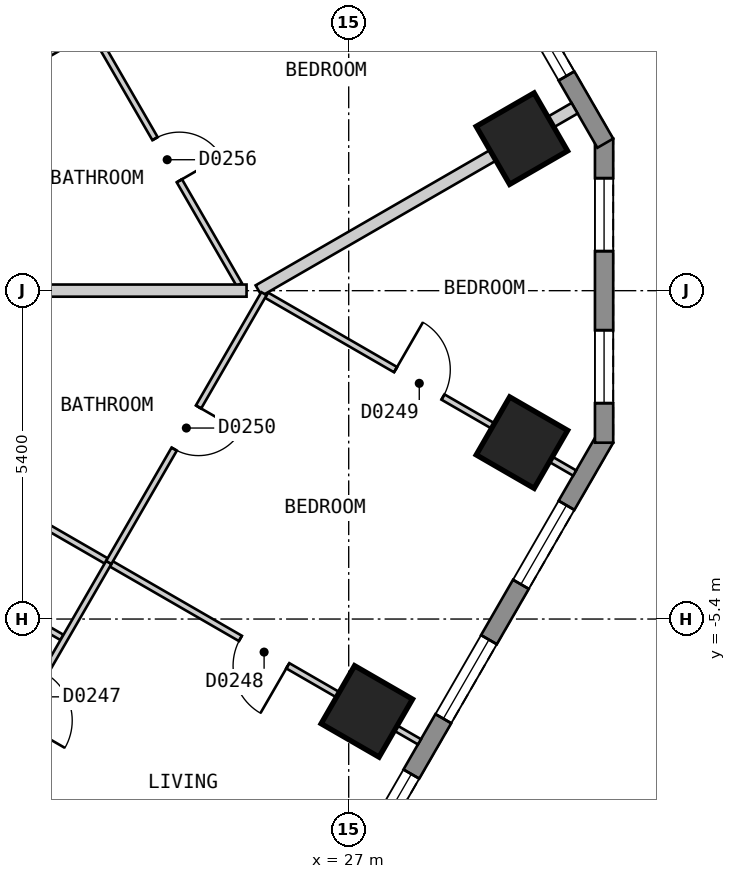
"""IFC4 building model, lengths in metres.
Left out: names, types, materials, properties, quantities, classifications, styles, units other than length and angle.
Written with IfcOpenShell. Run it as: python <this file> out.ifc"""

import sys

from ifc_helpers import new_model, si_unit, direction, frame, frame_2d, origin, origin_2d, place, context, subcontext, project, spatial, polyline, rectangle, outline, extrude, element, fill, save


model = new_model("IFC4")
c1 = context("Model", 3, precision=1e-05, world=origin(), true_north=direction((0.0, 1.0)))
c2 = subcontext(c1, "Body", "Model", "MODEL_VIEW")
j1 = project(units=[si_unit("LENGTHUNIT", "METRE"), si_unit("PLANEANGLEUNIT", "RADIAN")], contexts=[c1])
p1 = place(None, origin())
s1 = spatial("IfcSite", under=j1, at=p1, CompositionType="ELEMENT")
p2 = place(p1, origin())
s2 = spatial("IfcBuilding", under=s1, at=p2, CompositionType="ELEMENT")
p3 = place(p2, frame((0.0, 0.0, 47.4)))
s3 = spatial("IfcBuildingStorey", under=s2, at=p3, CompositionType="ELEMENT", Elevation=47.4)
for number, where, z_axis, x_axis in (
    (1, (27.298, -6.919, 0.0), (0.0, 0.0, 1.0), (0.5, 0.866, 0.0)),
    (2, (29.849, -2.499, 0.0), (0.0, 0.0, 1.0), (0.5, 0.866, 0.0)),
    (3, (29.848, 2.5, 0.0), (0.0, 0.0, 1.0), (-0.5, 0.866, 0.0)),
):
    element("IfcColumn", number, at=place(p3, frame(where, z_axis=z_axis, x_axis=x_axis)), inside=s3, PredefinedType="COLUMN", context=c2, shape_type="SweptSolid", body=[
        extrude(rectangle(XDim=1.1, YDim=1.1, at=origin_2d()), origin(), (0.0, 0.0, 1.0), 3.0),
    ])
p4 = place(p3, frame((17.71, -25.825, 0.0), z_axis=(0.0, 0.0, 1.0), x_axis=(0.500001938803, 0.866024284413, 0.0)))
e4 = element("IfcWall", 4, at=p4, inside=s3, PredefinedType="SOLIDWALL", context=c2, shape_type="SweptSolid", body=[
    extrude(outline(polyline([(0.0, -0.15), (27.02, -0.15), (26.94, 0.15), (0.08, 0.15), (0.0, -0.15)])), origin(), (0.0, 0.0, 1.0), 2.7),
])
p5 = place(p4, frame((1.277, 0.0, 0.15)))
e5 = element("IfcOpeningElement", 5, at=p5, cuts=e4, PredefinedType="OPENING", context=c2, shape_type="SweptSolid", body=[
    extrude(rectangle(XDim=1.5, YDim=2.1, at=frame_2d((0.75, 1.05))), frame((0.0, 0.16, 0.0), z_axis=(0.0, -1.0, 0.0), x_axis=(1.0, 0.0, 0.0)), (0.0, 0.0, 1.0), 0.32),
])
p6 = place(p4, frame((3.829, 0.0, 0.15)))
e6 = element("IfcOpeningElement", 6, at=p6, cuts=e4, PredefinedType="OPENING", context=c2, shape_type="SweptSolid", body=[
    extrude(rectangle(XDim=1.5, YDim=2.1, at=frame_2d((0.75, 1.05))), frame((0.0, 0.16, 0.0), z_axis=(0.0, -1.0, 0.0), x_axis=(1.0, 0.0, 0.0)), (0.0, 0.0, 1.0), 0.32),
])
p7 = place(p4, frame((6.382, 0.0, 0.15)))
e7 = element("IfcOpeningElement", 7, at=p7, cuts=e4, PredefinedType="OPENING", context=c2, shape_type="SweptSolid", body=[
    extrude(rectangle(XDim=1.5, YDim=2.1, at=frame_2d((0.75, 1.05))), frame((0.0, 0.16, 0.0), z_axis=(0.0, -1.0, 0.0), x_axis=(1.0, 0.0, 0.0)), (0.0, 0.0, 1.0), 0.32),
])
p8 = place(p4, frame((8.933, 0.0, 0.15)))
e8 = element("IfcOpeningElement", 8, at=p8, cuts=e4, PredefinedType="OPENING", context=c2, shape_type="SweptSolid", body=[
    extrude(rectangle(XDim=1.5, YDim=2.1, at=frame_2d((0.75, 1.05))), frame((0.0, 0.16, 0.0), z_axis=(0.0, -1.0, 0.0), x_axis=(1.0, 0.0, 0.0)), (0.0, 0.0, 1.0), 0.32),
])
p9 = place(p4, frame((11.485, 0.0, 0.15)))
e9 = element("IfcOpeningElement", 9, at=p9, cuts=e4, PredefinedType="OPENING", context=c2, shape_type="SweptSolid", body=[
    extrude(rectangle(XDim=1.5, YDim=2.1, at=frame_2d((0.75, 1.05))), frame((0.0, 0.16, 0.0), z_axis=(0.0, -1.0, 0.0), x_axis=(1.0, 0.0, 0.0)), (0.0, 0.0, 1.0), 0.32),
])
p10 = place(p4, frame((14.037, 0.0, 0.15)))
e10 = element("IfcOpeningElement", 10, at=p10, cuts=e4, PredefinedType="OPENING", context=c2, shape_type="SweptSolid", body=[
    extrude(rectangle(XDim=1.5, YDim=2.1, at=frame_2d((0.75, 1.05))), frame((0.0, 0.16, 0.0), z_axis=(0.0, -1.0, 0.0), x_axis=(1.0, 0.0, 0.0)), (0.0, 0.0, 1.0), 0.32),
])
p11 = place(p4, frame((16.589, 0.0, 0.15)))
e11 = element("IfcOpeningElement", 11, at=p11, cuts=e4, PredefinedType="OPENING", context=c2, shape_type="SweptSolid", body=[
    extrude(rectangle(XDim=1.5, YDim=2.1, at=frame_2d((0.75, 1.05))), frame((0.0, 0.16, 0.0), z_axis=(0.0, -1.0, 0.0), x_axis=(1.0, 0.0, 0.0)), (0.0, 0.0, 1.0), 0.32),
])
p12 = place(p4, frame((19.141, 0.0, 0.15)))
e12 = element("IfcOpeningElement", 12, at=p12, cuts=e4, PredefinedType="OPENING", context=c2, shape_type="SweptSolid", body=[
    extrude(rectangle(XDim=1.5, YDim=2.1, at=frame_2d((0.75, 1.05))), frame((0.0, 0.16, 0.0), z_axis=(0.0, -1.0, 0.0), x_axis=(1.0, 0.0, 0.0)), (0.0, 0.0, 1.0), 0.32),
])
p13 = place(p4, frame((21.693, 0.0, 0.15)))
e13 = element("IfcOpeningElement", 13, at=p13, cuts=e4, PredefinedType="OPENING", context=c2, shape_type="SweptSolid", body=[
    extrude(rectangle(XDim=1.5, YDim=2.1, at=frame_2d((0.75, 1.05))), frame((0.0, 0.16, 0.0), z_axis=(0.0, -1.0, 0.0), x_axis=(1.0, 0.0, 0.0)), (0.0, 0.0, 1.0), 0.32),
])
p14 = place(p4, frame((24.244, 0.0, 0.15)))
e14 = element("IfcOpeningElement", 14, at=p14, cuts=e4, PredefinedType="OPENING", context=c2, shape_type="SweptSolid", body=[
    extrude(rectangle(XDim=1.5, YDim=2.1, at=frame_2d((0.75, 1.05))), frame((0.0, 0.16, 0.0), z_axis=(0.0, -1.0, 0.0), x_axis=(1.0, 0.0, 0.0)), (0.0, 0.0, 1.0), 0.32),
])
p15 = place(p3, frame((31.2, -2.5, 0.0), z_axis=(0.0, 0.0, 1.0), x_axis=(0.0, 1.0, 0.0)))
e15 = element("IfcWall", 15, at=p15, inside=s3, PredefinedType="SOLIDWALL", context=c2, shape_type="SweptSolid", body=[
    extrude(outline(polyline([(0.0, -0.15), (5.0, -0.15), (4.92, 0.15), (0.08, 0.15), (0.0, -0.15)])), origin(), (0.0, 0.0, 1.0), 2.7),
])
p16 = place(p15, frame((0.65, 0.0, 0.15)))
e16 = element("IfcOpeningElement", 16, at=p16, cuts=e15, PredefinedType="OPENING", context=c2, shape_type="SweptSolid", body=[
    extrude(rectangle(XDim=1.2, YDim=2.1, at=frame_2d((0.6, 1.05))), frame((0.0, 0.16, 0.0), z_axis=(0.0, -1.0, 0.0), x_axis=(1.0, 0.0, 0.0)), (0.0, 0.0, 1.0), 0.32),
])
p17 = place(p15, frame((3.15, 0.0, 0.15)))
e17 = element("IfcOpeningElement", 17, at=p17, cuts=e15, PredefinedType="OPENING", context=c2, shape_type="SweptSolid", body=[
    extrude(rectangle(XDim=1.2, YDim=2.1, at=frame_2d((0.6, 1.05))), frame((0.0, 0.16, 0.0), z_axis=(0.0, -1.0, 0.0), x_axis=(1.0, 0.0, 0.0)), (0.0, 0.0, 1.0), 0.32),
])
p18 = place(p3, frame((31.22, 2.425, 0.0), z_axis=(0.0, 0.0, 1.0), x_axis=(-0.500001938803, 0.866024284413, 0.0)))
e18 = element("IfcWall", 18, at=p18, inside=s3, PredefinedType="SOLIDWALL", context=c2, shape_type="SweptSolid", body=[
    extrude(outline(polyline([(0.0, -0.15), (27.02, -0.15), (26.94, 0.15), (0.08, 0.15), (0.0, -0.15)])), origin(), (0.0, 0.0, 1.0), 2.7),
])
p19 = place(p18, frame((1.277, 0.0, 0.15)))
e19 = element("IfcOpeningElement", 19, at=p19, cuts=e18, PredefinedType="OPENING", context=c2, shape_type="SweptSolid", body=[
    extrude(rectangle(XDim=1.5, YDim=2.1, at=frame_2d((0.75, 1.05))), frame((0.0, 0.16, 0.0), z_axis=(0.0, -1.0, 0.0), x_axis=(1.0, 0.0, 0.0)), (0.0, 0.0, 1.0), 0.32),
])
p20 = place(p18, frame((3.829, 0.0, 0.15)))
e20 = element("IfcOpeningElement", 20, at=p20, cuts=e18, PredefinedType="OPENING", context=c2, shape_type="SweptSolid", body=[
    extrude(rectangle(XDim=1.5, YDim=2.1, at=frame_2d((0.75, 1.05))), frame((0.0, 0.16, 0.0), z_axis=(0.0, -1.0, 0.0), x_axis=(1.0, 0.0, 0.0)), (0.0, 0.0, 1.0), 0.32),
])
p21 = place(p18, frame((6.382, 0.0, 0.15)))
e21 = element("IfcOpeningElement", 21, at=p21, cuts=e18, PredefinedType="OPENING", context=c2, shape_type="SweptSolid", body=[
    extrude(rectangle(XDim=1.5, YDim=2.1, at=frame_2d((0.75, 1.05))), frame((0.0, 0.16, 0.0), z_axis=(0.0, -1.0, 0.0), x_axis=(1.0, 0.0, 0.0)), (0.0, 0.0, 1.0), 0.32),
])
p22 = place(p18, frame((8.933, 0.0, 0.15)))
e22 = element("IfcOpeningElement", 22, at=p22, cuts=e18, PredefinedType="OPENING", context=c2, shape_type="SweptSolid", body=[
    extrude(rectangle(XDim=1.5, YDim=2.1, at=frame_2d((0.75, 1.05))), frame((0.0, 0.16, 0.0), z_axis=(0.0, -1.0, 0.0), x_axis=(1.0, 0.0, 0.0)), (0.0, 0.0, 1.0), 0.32),
])
p23 = place(p18, frame((11.485, 0.0, 0.15)))
e23 = element("IfcOpeningElement", 23, at=p23, cuts=e18, PredefinedType="OPENING", context=c2, shape_type="SweptSolid", body=[
    extrude(rectangle(XDim=1.5, YDim=2.1, at=frame_2d((0.75, 1.05))), frame((0.0, 0.16, 0.0), z_axis=(0.0, -1.0, 0.0), x_axis=(1.0, 0.0, 0.0)), (0.0, 0.0, 1.0), 0.32),
])
p24 = place(p18, frame((14.037, 0.0, 0.15)))
e24 = element("IfcOpeningElement", 24, at=p24, cuts=e18, PredefinedType="OPENING", context=c2, shape_type="SweptSolid", body=[
    extrude(rectangle(XDim=1.5, YDim=2.1, at=frame_2d((0.75, 1.05))), frame((0.0, 0.16, 0.0), z_axis=(0.0, -1.0, 0.0), x_axis=(1.0, 0.0, 0.0)), (0.0, 0.0, 1.0), 0.32),
])
p25 = place(p18, frame((16.589, 0.0, 0.15)))
e25 = element("IfcOpeningElement", 25, at=p25, cuts=e18, PredefinedType="OPENING", context=c2, shape_type="SweptSolid", body=[
    extrude(rectangle(XDim=1.5, YDim=2.1, at=frame_2d((0.75, 1.05))), frame((0.0, 0.16, 0.0), z_axis=(0.0, -1.0, 0.0), x_axis=(1.0, 0.0, 0.0)), (0.0, 0.0, 1.0), 0.32),
])
p26 = place(p18, frame((19.141, 0.0, 0.15)))
e26 = element("IfcOpeningElement", 26, at=p26, cuts=e18, PredefinedType="OPENING", context=c2, shape_type="SweptSolid", body=[
    extrude(rectangle(XDim=1.5, YDim=2.1, at=frame_2d((0.75, 1.05))), frame((0.0, 0.16, 0.0), z_axis=(0.0, -1.0, 0.0), x_axis=(1.0, 0.0, 0.0)), (0.0, 0.0, 1.0), 0.32),
])
p27 = place(p18, frame((21.693, 0.0, 0.15)))
e27 = element("IfcOpeningElement", 27, at=p27, cuts=e18, PredefinedType="OPENING", context=c2, shape_type="SweptSolid", body=[
    extrude(rectangle(XDim=1.5, YDim=2.1, at=frame_2d((0.75, 1.05))), frame((0.0, 0.16, 0.0), z_axis=(0.0, -1.0, 0.0), x_axis=(1.0, 0.0, 0.0)), (0.0, 0.0, 1.0), 0.32),
])
p28 = place(p18, frame((24.244, 0.0, 0.15)))
e28 = element("IfcOpeningElement", 28, at=p28, cuts=e18, PredefinedType="OPENING", context=c2, shape_type="SweptSolid", body=[
    extrude(rectangle(XDim=1.5, YDim=2.1, at=frame_2d((0.75, 1.05))), frame((0.0, 0.16, 0.0), z_axis=(0.0, -1.0, 0.0), x_axis=(1.0, 0.0, 0.0)), (0.0, 0.0, 1.0), 0.32),
])
p29 = place(p3, frame((22.796, 4.264, 0.0), z_axis=(0.0, 0.0, 1.0), x_axis=(0.500099052605, -0.865968208183, 0.0)))
e29 = element("IfcWall", 29, at=p29, inside=s3, PredefinedType="PARTITIONING", context=c2, shape_type="SweptSolid", body=[
    extrude(rectangle(XDim=4.807, YDim=0.1, at=frame_2d((2.404, 0.0))), origin(), (0.0, 0.0, 1.0), 2.7),
])
p30 = place(p29, frame((2.037, 0.0, 0.0)))
e30 = element("IfcOpeningElement", 30, at=p30, cuts=e29, PredefinedType="OPENING", context=c2, shape_type="SweptSolid", body=[
    extrude(rectangle(XDim=0.8, YDim=2.1, at=frame_2d((0.4, 1.05))), frame((0.0, 0.06, 0.0), z_axis=(0.0, -1.0, 0.0), x_axis=(1.0, 0.0, 0.0)), (0.0, 0.0, 1.0), 0.12),
])
p31 = place(p3, frame((18.777, -3.677, 0.0), z_axis=(0.0, 0.0, 1.0), x_axis=(0.866000843773, -0.500042536776, 0.0)))
e31 = element("IfcWall", 31, at=p31, inside=s3, PredefinedType="PARTITIONING", context=c2, shape_type="SweptSolid", body=[
    extrude(rectangle(XDim=4.05, YDim=0.1, at=frame_2d((2.025, 0.0))), origin(), (0.0, 0.0, 1.0), 2.7),
])
p32 = place(p31, frame((1.55, 0.0, 0.0)))
e32 = element("IfcOpeningElement", 32, at=p32, cuts=e31, PredefinedType="OPENING", context=c2, shape_type="SweptSolid", body=[
    extrude(rectangle(XDim=0.9, YDim=2.1, at=frame_2d((0.45, 1.05))), frame((0.0, 0.06, 0.0), z_axis=(0.0, -1.0, 0.0), x_axis=(1.0, 0.0, 0.0)), (0.0, 0.0, 1.0), 0.12),
])
p33 = place(p3, frame((19.503, -2.419, 0.0), z_axis=(0.0, 0.0, 1.0), x_axis=(0.866047370643, -0.499961950354, 0.0)))
e33 = element("IfcWall", 33, at=p33, inside=s3, PredefinedType="PARTITIONING", context=c2, shape_type="SweptSolid", body=[
    extrude(rectangle(XDim=10.001, YDim=0.1, at=frame_2d((5.0, 0.0))), origin(), (0.0, 0.0, 1.0), 2.7),
])
p34 = place(p33, frame((6.6, 0.0, 0.0)))
e34 = element("IfcOpeningElement", 34, at=p34, cuts=e33, PredefinedType="OPENING", context=c2, shape_type="SweptSolid", body=[
    extrude(rectangle(XDim=0.9, YDim=2.1, at=frame_2d((0.45, 1.05))), frame((0.0, 0.06, 0.0), z_axis=(0.0, -1.0, 0.0), x_axis=(1.0, 0.0, 0.0)), (0.0, 0.0, 1.0), 0.12),
])
p35 = place(p3, frame((25.649, -0.074, 0.0), z_axis=(0.0, 0.0, 1.0), x_axis=(0.866059819573, -0.499940385368, 0.0)))
e35 = element("IfcWall", 35, at=p35, inside=s3, PredefinedType="PARTITIONING", context=c2, shape_type="SweptSolid", body=[
    extrude(rectangle(XDim=5.851, YDim=0.1, at=frame_2d((2.925, 0.0))), origin(), (0.0, 0.0, 1.0), 2.7),
])
p36 = place(p35, frame((2.45, 0.0, 0.0)))
e36 = element("IfcOpeningElement", 36, at=p36, cuts=e35, PredefinedType="OPENING", context=c2, shape_type="SweptSolid", body=[
    extrude(rectangle(XDim=0.9, YDim=2.1, at=frame_2d((0.45, 1.05))), frame((0.0, 0.06, 0.0), z_axis=(0.0, -1.0, 0.0), x_axis=(1.0, 0.0, 0.0)), (0.0, 0.0, 1.0), 0.12),
])
p37 = place(p3, frame((20.978, -8.065, 0.0), z_axis=(0.0, 0.0, 1.0), x_axis=(0.499965068118, 0.866045570776, 0.0)))
e37 = element("IfcWall", 37, at=p37, inside=s3, PredefinedType="PARTITIONING", context=c2, shape_type="SweptSolid", body=[
    extrude(rectangle(XDim=4.152, YDim=0.1, at=frame_2d((2.076, 0.0))), origin(), (0.0, 0.0, 1.0), 2.7),
])
p38 = place(p37, frame((1.15, 0.0, 0.0)))
e38 = element("IfcOpeningElement", 38, at=p38, cuts=e37, PredefinedType="OPENING", context=c2, shape_type="SweptSolid", body=[
    extrude(rectangle(XDim=0.9, YDim=2.1, at=frame_2d((0.45, 1.05))), frame((0.0, 0.06, 0.0), z_axis=(0.0, -1.0, 0.0), x_axis=(1.0, 0.0, 0.0)), (0.0, 0.0, 1.0), 0.12),
])
p39 = place(p3, frame((19.503, 2.421, 0.0), z_axis=(0.0, 0.0, 1.0), x_axis=(0.866065245018, 0.499930986609, 0.0)))
e39 = element("IfcWall", 39, at=p39, inside=s3, PredefinedType="PARTITIONING", context=c2, shape_type="SweptSolid", body=[
    extrude(rectangle(XDim=10.0, YDim=0.1, at=frame_2d((5.0, 0.0))), origin(), (0.0, 0.0, 1.0), 2.7),
])
p40 = place(p39, frame((4.932, 0.0, 0.0)))
e40 = element("IfcOpeningElement", 40, at=p40, cuts=e39, PredefinedType="OPENING", context=c2, shape_type="SweptSolid", body=[
    extrude(rectangle(XDim=0.9, YDim=2.1, at=frame_2d((0.45, 1.05))), frame((0.0, 0.06, 0.0), z_axis=(0.0, -1.0, 0.0), x_axis=(1.0, 0.0, 0.0)), (0.0, 0.0, 1.0), 0.12),
])
p41 = place(p3, frame((16.916, -6.819, 0.0), z_axis=(0.0, 0.0, 1.0), x_axis=(0.866028876723, -0.499993984646, 0.0)))
e41 = element("IfcWall", 41, at=p41, inside=s3, PredefinedType="PARTITIONING", context=c2, shape_type="SweptSolid", body=[
    extrude(rectangle(XDim=10.04, YDim=0.2, at=frame_2d((5.02, 0.0))), origin(), (0.0, 0.0, 1.0), 2.7),
])
p42 = place(p3, frame((20.784, 0.001, 0.0), z_axis=(0.0, 0.0, 1.0), x_axis=(1.0, 0.0, 0.0)))
e42 = element("IfcWall", 42, at=p42, inside=s3, PredefinedType="PARTITIONING", context=c2, shape_type="SweptSolid", body=[
    extrude(rectangle(XDim=4.536, YDim=0.2, at=frame_2d((2.268, 0.0))), origin(), (0.0, 0.0, 1.0), 2.7),
])
p43 = place(p3, frame((25.519, 0.001, 0.0), z_axis=(0.0, 0.0, 1.0), x_axis=(0.86609140076, 0.499885672459, 0.0)))
e43 = element("IfcWall", 43, at=p43, inside=s3, PredefinedType="PARTITIONING", context=c2, shape_type="SweptSolid", body=[
    extrude(rectangle(XDim=6.0, YDim=0.2, at=frame_2d((3.0, 0.0))), origin(), (0.0, 0.0, 1.0), 2.7),
])
p44 = place(p3, frame((23.054, -4.469, 0.0), z_axis=(0.0, 0.0, 1.0), x_axis=(0.500023345639, 0.866011924754, 0.0)))
e44 = element("IfcWall", 44, at=p44, inside=s3, PredefinedType="PARTITIONING", context=c2, shape_type="SweptSolid", body=[
    extrude(rectangle(XDim=5.104, YDim=0.1, at=frame_2d((2.552, 0.0))), origin(), (0.0, 0.0, 1.0), 2.7),
])
p45 = place(p44, frame((2.152, 0.0, 0.0)))
e45 = element("IfcOpeningElement", 45, at=p45, cuts=e44, PredefinedType="OPENING", context=c2, shape_type="SweptSolid", body=[
    extrude(rectangle(XDim=0.8, YDim=2.1, at=frame_2d((0.4, 1.05))), frame((0.0, 0.06, 0.0), z_axis=(0.0, -1.0, 0.0), x_axis=(1.0, 0.0, 0.0)), (0.0, 0.0, 1.0), 0.12),
])
p46 = place(p12, origin())
e46 = element("IfcWindow", 46, at=p46, inside=s3, PartitioningType="SINGLE_PANEL", PredefinedType="WINDOW", context=c2, shape_type="SweptSolid", body=[
    extrude(rectangle(XDim=1.5, YDim=2.1, at=frame_2d((0.75, 1.05))), frame((0.0, 0.03, 0.0), z_axis=(0.0, -1.0, 0.0), x_axis=(1.0, 0.0, 0.0)), (0.0, 0.0, 1.0), 0.06),
])
fill(e12, e46)
p47 = place(p13, origin())
e47 = element("IfcWindow", 47, at=p47, inside=s3, PartitioningType="SINGLE_PANEL", PredefinedType="WINDOW", context=c2, shape_type="SweptSolid", body=[
    extrude(rectangle(XDim=1.5, YDim=2.1, at=frame_2d((0.75, 1.05))), frame((0.0, 0.03, 0.0), z_axis=(0.0, -1.0, 0.0), x_axis=(1.0, 0.0, 0.0)), (0.0, 0.0, 1.0), 0.06),
])
fill(e13, e47)
p48 = place(p14, origin())
e48 = element("IfcWindow", 48, at=p48, inside=s3, PartitioningType="SINGLE_PANEL", PredefinedType="WINDOW", context=c2, shape_type="SweptSolid", body=[
    extrude(rectangle(XDim=1.5, YDim=2.1, at=frame_2d((0.75, 1.05))), frame((0.0, 0.03, 0.0), z_axis=(0.0, -1.0, 0.0), x_axis=(1.0, 0.0, 0.0)), (0.0, 0.0, 1.0), 0.06),
])
fill(e14, e48)
p49 = place(p16, origin())
e49 = element("IfcWindow", 49, at=p49, inside=s3, PartitioningType="SINGLE_PANEL", PredefinedType="WINDOW", context=c2, shape_type="SweptSolid", body=[
    extrude(rectangle(XDim=1.2, YDim=2.1, at=frame_2d((0.6, 1.05))), frame((0.0, 0.03, 0.0), z_axis=(0.0, -1.0, 0.0), x_axis=(1.0, 0.0, 0.0)), (0.0, 0.0, 1.0), 0.06),
])
fill(e16, e49)
p50 = place(p17, origin())
e50 = element("IfcWindow", 50, at=p50, inside=s3, PartitioningType="SINGLE_PANEL", PredefinedType="WINDOW", context=c2, shape_type="SweptSolid", body=[
    extrude(rectangle(XDim=1.2, YDim=2.1, at=frame_2d((0.6, 1.05))), frame((0.0, 0.03, 0.0), z_axis=(0.0, -1.0, 0.0), x_axis=(1.0, 0.0, 0.0)), (0.0, 0.0, 1.0), 0.06),
])
fill(e17, e50)
p51 = place(p19, origin())
e51 = element("IfcWindow", 51, at=p51, inside=s3, PartitioningType="SINGLE_PANEL", PredefinedType="WINDOW", context=c2, shape_type="SweptSolid", body=[
    extrude(rectangle(XDim=1.5, YDim=2.1, at=frame_2d((0.75, 1.05))), frame((0.0, 0.03, 0.0), z_axis=(0.0, -1.0, 0.0), x_axis=(1.0, 0.0, 0.0)), (0.0, 0.0, 1.0), 0.06),
])
fill(e19, e51)
p52 = place(p34, origin())
e52 = element("IfcDoor", 52, at=p52, inside=s3, OperationType="SINGLE_SWING_RIGHT", PredefinedType="DOOR", context=c2, shape_type="SweptSolid", body=[
    extrude(rectangle(XDim=0.9, YDim=2.1, at=frame_2d((0.45, 1.05))), frame((0.0, 0.025, 0.0), z_axis=(0.0, -1.0, 0.0), x_axis=(1.0, 0.0, 0.0)), (0.0, 0.0, 1.0), 0.05),
])
fill(e34, e52)
p53 = place(p36, origin())
e53 = element("IfcDoor", 53, at=p53, inside=s3, OperationType="SINGLE_SWING_LEFT", PredefinedType="DOOR", context=c2, shape_type="SweptSolid", body=[
    extrude(rectangle(XDim=0.9, YDim=2.1, at=frame_2d((0.45, 1.05))), frame((0.0, 0.025, 0.0), z_axis=(0.0, -1.0, 0.0), x_axis=(1.0, 0.0, 0.0)), (0.0, 0.0, 1.0), 0.05),
])
fill(e36, e53)
p54 = place(p45, origin())
e54 = element("IfcDoor", 54, at=p54, inside=s3, OperationType="SINGLE_SWING_RIGHT", PredefinedType="DOOR", context=c2, shape_type="SweptSolid", body=[
    extrude(rectangle(XDim=0.8, YDim=2.1, at=frame_2d((0.4, 1.05))), frame((0.0, 0.025, 0.0), z_axis=(0.0, -1.0, 0.0), x_axis=(1.0, 0.0, 0.0)), (0.0, 0.0, 1.0), 0.05),
])
fill(e45, e54)
p55 = place(p30, origin())
e55 = element("IfcDoor", 55, at=p55, inside=s3, OperationType="SINGLE_SWING_RIGHT", PredefinedType="DOOR", context=c2, shape_type="SweptSolid", body=[
    extrude(rectangle(XDim=0.8, YDim=2.1, at=frame_2d((0.4, 1.05))), frame((0.0, 0.025, 0.0), z_axis=(0.0, -1.0, 0.0), x_axis=(1.0, 0.0, 0.0)), (0.0, 0.0, 1.0), 0.05),
])
fill(e30, e55)
save(model, sys.argv[1])
